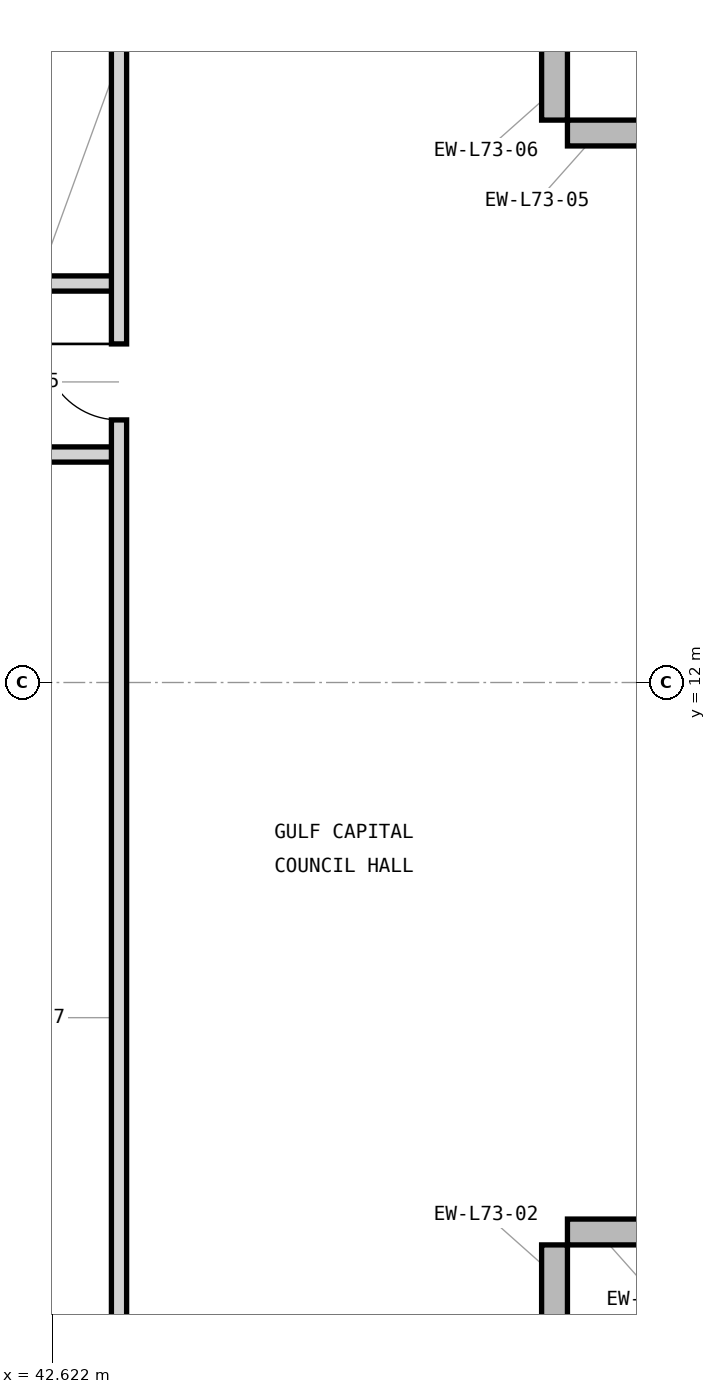
"""IFC4 building model, lengths in metres.
Left out: names, types, materials, properties, quantities, classifications, styles, units other than length and angle.
Written with IfcOpenShell. Run it as: python <this file> out.ifc"""

import sys

from ifc_helpers import new_model, si_unit, direction, frame, frame_2d, origin, place, context, subcontext, project, spatial, rectangle, extrude, element, fill, save


model = new_model("IFC4")
c1 = context("Model", 3, precision=1e-05, world=origin(), true_north=direction((0.0, 1.0)))
c2 = subcontext(c1, "Body", "Model", "MODEL_VIEW")
j1 = project(units=[si_unit("LENGTHUNIT", "METRE"), si_unit("PLANEANGLEUNIT", "RADIAN")], contexts=[c1])
p1 = place(None, origin())
s1 = spatial("IfcSite", under=j1, at=p1, CompositionType="ELEMENT")
p2 = place(p1, origin())
s2 = spatial("IfcBuilding", under=s1, at=p2, CompositionType="ELEMENT")
p3 = place(p2, frame((0.0, 0.0, 297.6)))
s3 = spatial("IfcBuildingStorey", under=s2, at=p3, CompositionType="ELEMENT", Elevation=297.6)
for number, where, z_axis, x_axis in (
    (1, (49.23, 3.0, 0.0), (0.0, 0.0, 1.0), (0.0, 1.0, 0.0)),
    (2, (49.4, 4.77, 0.0), (0.0, 0.0, 1.0), (1.0, 0.0, 0.0)),
    (3, (51.0, 19.23, 0.0), (0.0, 0.0, 1.0), (-1.0, 0.0, 0.0)),
    (4, (49.23, 19.4, 0.0), (0.0, 0.0, 1.0), (0.0, 1.0, 0.0)),
):
    element("IfcWall", number, at=place(p3, frame(where, z_axis=z_axis, x_axis=x_axis)), inside=s3, PredefinedType="STANDARD", context=c2, shape_type="SweptSolid", body=[
        extrude(rectangle(XDim=1.6, YDim=0.34, at=frame_2d((0.8, 0.0))), origin(), (0.0, 0.0, 1.0), 3.715),
    ])
p4 = place(p3, frame((37.2, 15.0, 0.0), z_axis=(0.0, 0.0, 1.0), x_axis=(1.0, 0.0, 0.0)))
e5 = element("IfcWall", 5, at=p4, inside=s3, PredefinedType="PARTITIONING", context=c2, shape_type="SweptSolid", body=[
    extrude(rectangle(XDim=6.3, YDim=0.2, at=frame_2d((3.15, 0.0))), origin(), (0.0, 0.0, 1.0), 3.354),
])
p5 = place(p4, frame((2.4, 0.0, 0.0)))
e6 = element("IfcOpeningElement", 6, at=p5, cuts=e5, PredefinedType="OPENING", context=c2, shape_type="SweptSolid", body=[
    extrude(rectangle(XDim=1.5, YDim=2.3, at=frame_2d((0.75, 1.15))), frame((0.0, 0.11, 0.0), z_axis=(0.0, -1.0, 0.0), x_axis=(1.0, 0.0, 0.0)), (0.0, 0.0, 1.0), 0.22),
])
p6 = place(p3, frame((39.2, 17.25, 0.0), z_axis=(0.0, 0.0, 1.0), x_axis=(1.0, 0.0, 0.0)))
e7 = element("IfcWall", 7, at=p6, inside=s3, PredefinedType="PARTITIONING", context=c2, shape_type="SweptSolid", body=[
    extrude(rectangle(XDim=4.3, YDim=0.2, at=frame_2d((2.15, 0.0))), origin(), (0.0, 0.0, 1.0), 3.705),
])
p7 = place(p6, frame((1.65, 0.0, 0.0)))
e8 = element("IfcOpeningElement", 8, at=p7, cuts=e7, PredefinedType="OPENING", context=c2, shape_type="SweptSolid", body=[
    extrude(rectangle(XDim=1.0, YDim=2.15, at=frame_2d((0.5, 1.075))), frame((0.0, 0.11, 0.0), z_axis=(0.0, -1.0, 0.0), x_axis=(1.0, 0.0, 0.0)), (0.0, 0.0, 1.0), 0.22),
])
p8 = place(p3, frame((43.5, 3.18, 0.0), z_axis=(0.0, 0.0, 1.0), x_axis=(0.0, 1.0, 0.0)))
e9 = element("IfcWall", 9, at=p8, inside=s3, PredefinedType="PARTITIONING", context=c2, shape_type="SweptSolid", body=[
    extrude(rectangle(XDim=17.64, YDim=0.2, at=frame_2d((8.82, 0.0))), origin(), (0.0, 0.0, 1.0), 3.705),
])
p9 = place(p8, frame((12.275, 0.0, 0.0)))
e10 = element("IfcOpeningElement", 10, at=p9, cuts=e9, PredefinedType="OPENING", context=c2, shape_type="SweptSolid", body=[
    extrude(rectangle(XDim=1.0, YDim=2.15, at=frame_2d((0.5, 1.075))), frame((0.0, 0.11, 0.0), z_axis=(0.0, -1.0, 0.0), x_axis=(1.0, 0.0, 0.0)), (0.0, 0.0, 1.0), 0.22),
])
p10 = place(p9, origin())
e11 = element("IfcDoor", 11, at=p10, inside=s3, OperationType="SINGLE_SWING_RIGHT", PredefinedType="DOOR", context=c2, shape_type="SweptSolid", body=[
    extrude(rectangle(XDim=1.0, YDim=2.15, at=frame_2d((0.5, 1.075))), frame((0.0, 0.025, 0.0), z_axis=(0.0, -1.0, 0.0), x_axis=(1.0, 0.0, 0.0)), (0.0, 0.0, 1.0), 0.05),
])
fill(e10, e11)
save(model, sys.argv[1])
